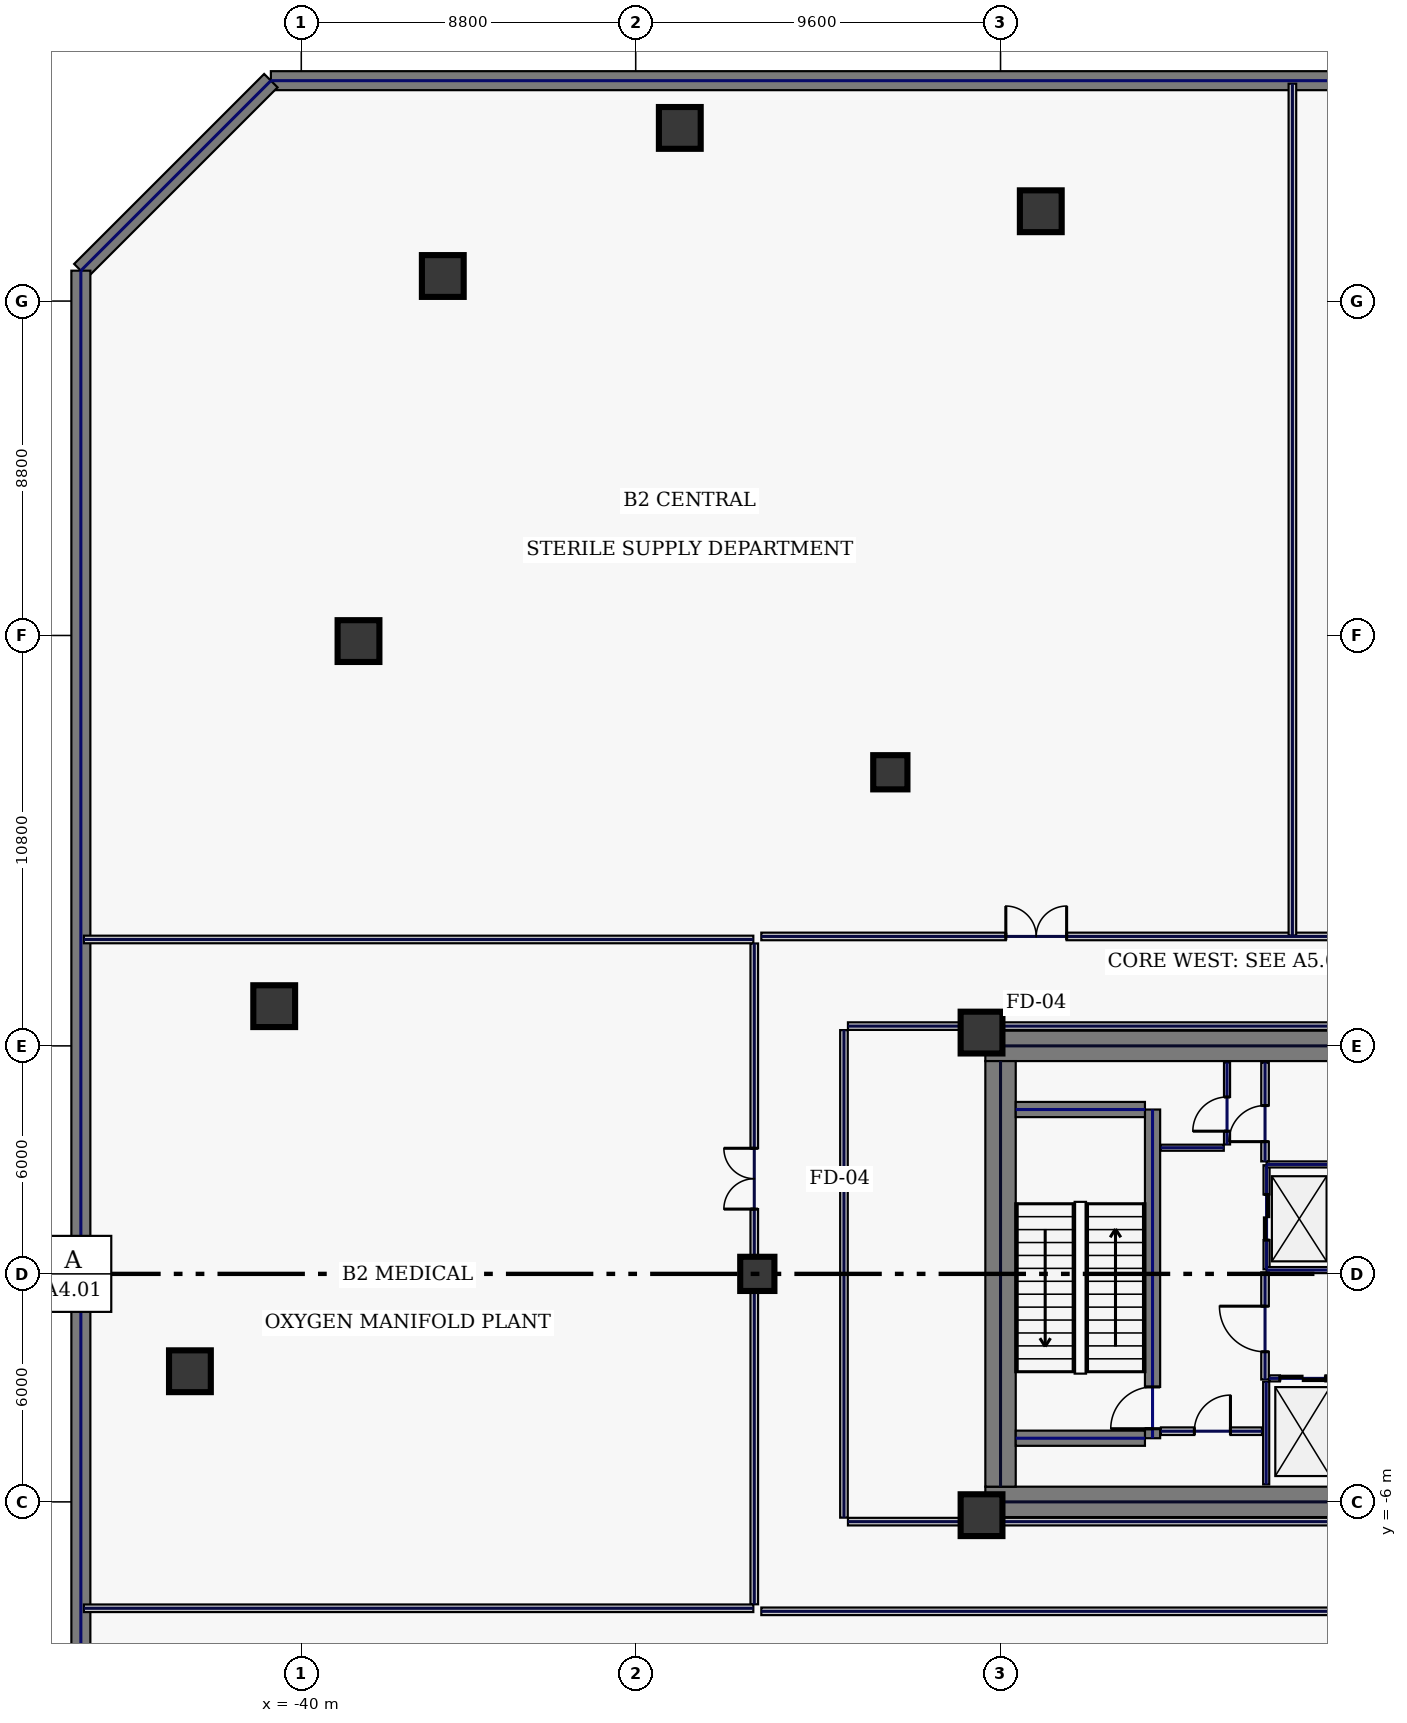
"""IFC4 building model, lengths in metres.
Left out: names, types, materials, properties, quantities, classifications, styles, units other than length and angle.
Written with IfcOpenShell. Run it as: python <this file> out.ifc"""

import sys

from ifc_helpers import new_model, si_unit, direction, frame, frame_2d, origin, origin_2d, place, context, subcontext, project, spatial, rectangle, extrude, element, fill, save


model = new_model("IFC4")
c1 = context("Model", 3, precision=1e-05, world=origin(), true_north=direction((0.0, 1.0)))
c2 = subcontext(c1, "Body", "Model", "MODEL_VIEW")
j1 = project(units=[si_unit("LENGTHUNIT", "METRE"), si_unit("PLANEANGLEUNIT", "RADIAN")], contexts=[c1])
p1 = place(None, origin())
s1 = spatial("IfcSite", under=j1, at=p1, CompositionType="ELEMENT")
p2 = place(p1, origin())
s2 = spatial("IfcBuilding", under=s1, at=p2, CompositionType="ELEMENT")
p3 = place(p2, frame((0.0, 0.0, -10.2)))
s3 = spatial("IfcBuildingStorey", under=s2, at=p3, CompositionType="ELEMENT", Elevation=-10.2)
p4 = place(p3, frame((40.8, 31.4, 0.0), z_axis=(0.0, 0.0, 1.0), x_axis=(-1.0, 0.0, 0.0)))
e1 = element("IfcWall", 1, at=p4, inside=s3, PredefinedType="SHEAR", context=c2, shape_type="SweptSolid", body=[
    extrude(rectangle(XDim=81.6, YDim=0.5, at=frame_2d((40.8, 0.0))), origin(), (0.0, 0.0, 1.0), 4.45),
])
p5 = place(p3, frame((-40.8, 31.4, 0.0), z_axis=(0.0, 0.0, 1.0), x_axis=(-0.707106781187, -0.707106781187, 0.0)))
e2 = element("IfcWall", 2, at=p5, inside=s3, PredefinedType="SHEAR", context=c2, shape_type="SweptSolid", body=[
    extrude(rectangle(XDim=7.071, YDim=0.5, at=frame_2d((3.536, 0.0))), origin(), (0.0, 0.0, 1.0), 4.45),
])
p6 = place(p3, frame((-45.8, 26.4, 0.0), z_axis=(0.0, 0.0, 1.0), x_axis=(0.0, -1.0, 0.0)))
e3 = element("IfcWall", 3, at=p6, inside=s3, PredefinedType="SHEAR", context=c2, shape_type="SweptSolid", body=[
    extrude(rectangle(XDim=56.2, YDim=0.5, at=frame_2d((28.1, 0.0))), origin(), (0.0, 0.0, 1.0), 4.45),
])
for number, where, z_axis, x_axis in (
    (4, (-22.0, 6.0, 0.0), (0.0, 0.0, 1.0), (1.0, 0.0, 0.0)),
    (5, (-22.0, -6.0, 0.0), (0.0, 0.0, 1.0), (1.0, 0.0, 0.0)),
):
    element("IfcWall", number, at=place(p3, frame(where, z_axis=z_axis, x_axis=x_axis)), inside=s3, PredefinedType="SHEAR", context=c2, shape_type="SweptSolid", body=[
        extrude(rectangle(XDim=11.6, YDim=0.8, at=frame_2d((5.8, 0.0))), origin(), (0.0, 0.0, 1.0), 4.45),
    ])
p7 = place(p3, frame((-21.6, -5.6, 0.0), z_axis=(0.0, 0.0, 1.0), x_axis=(0.0, 1.0, 0.0)))
e6 = element("IfcWall", 6, at=p7, inside=s3, PredefinedType="SHEAR", context=c2, shape_type="SweptSolid", body=[
    extrude(rectangle(XDim=11.2, YDim=0.8, at=frame_2d((5.6, 0.0))), origin(), (0.0, 0.0, 1.0), 4.45),
])
p8 = place(p3, frame((-17.6, -4.325, 0.0), z_axis=(0.0, 0.0, 1.0), x_axis=(0.0, 1.0, 0.0)))
e7 = element("IfcWall", 7, at=p8, inside=s3, PredefinedType="SHEAR", context=c2, shape_type="SweptSolid", body=[
    extrude(rectangle(XDim=8.65, YDim=0.4, at=frame_2d((4.325, 0.0))), origin(), (0.0, 0.0, 1.0), 4.45),
])
p9 = place(p8, frame((0.25, 0.0, 0.0)))
e8 = element("IfcOpeningElement", 8, at=p9, cuts=e7, PredefinedType="OPENING", context=c2, shape_type="SweptSolid", body=[
    extrude(rectangle(XDim=1.1, YDim=2.2, at=frame_2d((0.55, 1.1))), frame((0.0, 0.21, 0.0), z_axis=(0.0, -1.0, 0.0), x_axis=(1.0, 0.0, 0.0)), (0.0, 0.0, 1.0), 0.42),
])
for number, where, z_axis, x_axis in (
    (9, (-21.2, -4.325, 0.0), (0.0, 0.0, 1.0), (1.0, 0.0, 0.0)),
    (10, (-21.2, 4.325, 0.0), (0.0, 0.0, 1.0), (1.0, 0.0, 0.0)),
):
    element("IfcWall", number, at=place(p3, frame(where, z_axis=z_axis, x_axis=x_axis)), inside=s3, PredefinedType="SHEAR", context=c2, shape_type="SweptSolid", body=[
        extrude(rectangle(XDim=3.4, YDim=0.4, at=frame_2d((1.7, 0.0))), origin(), (0.0, 0.0, 1.0), 4.45),
    ])
for number, where, z_axis, x_axis in (
    (11, (-22.1, -6.35, 0.0), (0.0, 0.0, 1.0), (1.0, 0.0, 0.0)),
    (12, (-22.1, 6.35, 0.0), (0.0, 0.0, 1.0), (1.0, 0.0, 0.0)),
):
    element("IfcColumn", number, at=place(p3, frame(where, z_axis=z_axis, x_axis=x_axis)), inside=s3, PredefinedType="COLUMN", context=c2, shape_type="SweptSolid", body=[
        extrude(rectangle(XDim=1.1, YDim=1.1, at=origin_2d()), origin(), (0.0, 0.0, 1.0), 4.45),
    ])
for number, where, z_axis, x_axis in (
    (13, (-24.5, 13.2, 0.0), (0.0, 0.0, 1.0), (1.0, 0.0, 0.0)),
    (14, (-28.0, 0.0, 0.0), (0.0, 0.0, 1.0), (1.0, 0.0, 0.0)),
):
    element("IfcColumn", number, at=place(p3, frame(where, z_axis=z_axis, x_axis=x_axis)), inside=s3, PredefinedType="COLUMN", context=c2, shape_type="SweptSolid", body=[
        extrude(rectangle(XDim=0.9, YDim=0.9, at=origin_2d()), origin(), (0.0, 0.0, 1.0), 4.45),
    ])
for number, where, z_axis, x_axis in (
    (15, (-20.541, 27.964, 0.0), (0.0, 0.0, 1.0), (1.0, 0.0, 0.0)),
    (16, (-30.04, 30.156, 0.0), (0.0, 0.0, 1.0), (1.0, 0.0, 0.0)),
    (17, (-36.276, 26.26, 0.0), (0.0, 0.0, 1.0), (1.0, 0.0, 0.0)),
    (18, (-38.494, 16.652, 0.0), (0.0, 0.0, 1.0), (1.0, 0.0, 0.0)),
    (19, (-40.712, 7.045, 0.0), (0.0, 0.0, 1.0), (1.0, 0.0, 0.0)),
    (20, (-42.93, -2.562, 0.0), (0.0, 0.0, 1.0), (1.0, 0.0, 0.0)),
):
    element("IfcColumn", number, at=place(p3, frame(where, z_axis=z_axis, x_axis=x_axis)), inside=s3, PredefinedType="COLUMN", context=c2, shape_type="SweptSolid", body=[
        extrude(rectangle(XDim=1.1, YDim=1.1, at=origin_2d()), origin(), (0.0, 0.0, 1.0), 4.45),
    ])
p10 = place(p3, frame((-14.6, 0.12, 0.0), z_axis=(0.0, 0.0, 1.0), x_axis=(0.0, 1.0, 0.0)))
e21 = element("IfcWall", 21, at=p10, inside=s3, PredefinedType="PARTITIONING", context=c2, shape_type="SweptSolid", body=[
    extrude(rectangle(XDim=2.74, YDim=0.16, at=frame_2d((1.37, 0.0))), origin(), (0.0, 0.0, 1.0), 4.45),
])
p11 = place(p10, frame((0.77, 0.0, 0.0)))
e22 = element("IfcOpeningElement", 22, at=p11, cuts=e21, PredefinedType="OPENING", context=c2, shape_type="SweptSolid", body=[
    extrude(rectangle(XDim=1.2, YDim=2.2, at=frame_2d((0.6, 1.1))), frame((0.0, 0.09, 0.0), z_axis=(0.0, -1.0, 0.0), x_axis=(1.0, 0.0, 0.0)), (0.0, 0.0, 1.0), 0.18),
])
for number, where, z_axis, x_axis in (
    (23, (-14.6, 0.1, 0.0), (0.0, 0.0, 1.0), (1.0, 0.0, 0.0)),
    (24, (-14.6, 2.88, 0.0), (0.0, 0.0, 1.0), (1.0, 0.0, 0.0)),
):
    element("IfcWall", number, at=place(p3, frame(where, z_axis=z_axis, x_axis=x_axis)), inside=s3, PredefinedType="PARTITIONING", context=c2, shape_type="SweptSolid", body=[
        extrude(rectangle(XDim=1.76, YDim=0.16, at=frame_2d((0.88, 0.0))), origin(), (0.0, 0.0, 1.0), 4.45),
    ])
p12 = place(p3, frame((-14.53, -2.75, 0.0), z_axis=(0.0, 0.0, 1.0), x_axis=(1.0, 0.0, 0.0)))
e25 = element("IfcWall", 25, at=p12, inside=s3, PredefinedType="PARTITIONING", context=c2, shape_type="SweptSolid", body=[
    extrude(rectangle(XDim=1.76, YDim=0.16, at=frame_2d((0.88, 0.0))), origin(), (0.0, 0.0, 1.0), 4.45),
])
p13 = place(p12, frame((0.28, 0.0, 0.0)))
e26 = element("IfcOpeningElement", 26, at=p13, cuts=e25, PredefinedType="OPENING", context=c2, shape_type="SweptSolid", body=[
    extrude(rectangle(XDim=1.2, YDim=2.2, at=frame_2d((0.6, 1.1))), frame((0.0, 0.09, 0.0), z_axis=(0.0, -1.0, 0.0), x_axis=(1.0, 0.0, 0.0)), (0.0, 0.0, 1.0), 0.18),
])
p14 = place(p3, frame((-14.61, -5.54, 0.0), z_axis=(0.0, 0.0, 1.0), x_axis=(0.0, 1.0, 0.0)))
e27 = element("IfcWall", 27, at=p14, inside=s3, PredefinedType="PARTITIONING", context=c2, shape_type="SweptSolid", body=[
    extrude(rectangle(XDim=2.7, YDim=0.16, at=frame_2d((1.35, 0.0))), origin(), (0.0, 0.0, 1.0), 4.45),
])
p15 = place(p3, frame((-15.64, 3.405, 0.0), z_axis=(0.0, 0.0, 1.0), x_axis=(0.0, 1.0, 0.0)))
e28 = element("IfcWall", 28, at=p15, inside=s3, PredefinedType="PARTITIONING", context=c2, shape_type="SweptSolid", body=[
    extrude(rectangle(XDim=2.155, YDim=0.16, at=frame_2d((1.078, 0.0))), origin(), (0.0, 0.0, 1.0), 4.45),
])
p16 = place(p15, frame((0.35, 0.0, 0.0)))
e29 = element("IfcOpeningElement", 29, at=p16, cuts=e28, PredefinedType="OPENING", context=c2, shape_type="SweptSolid", body=[
    extrude(rectangle(XDim=0.9, YDim=2.2, at=frame_2d((0.45, 1.1))), frame((0.0, 0.09, 0.0), z_axis=(0.0, -1.0, 0.0), x_axis=(1.0, 0.0, 0.0)), (0.0, 0.0, 1.0), 0.18),
])
p17 = place(p3, frame((-17.38, 3.32, 0.0), z_axis=(0.0, 0.0, 1.0), x_axis=(1.0, 0.0, 0.0)))
e30 = element("IfcWall", 30, at=p17, inside=s3, PredefinedType="PARTITIONING", context=c2, shape_type="SweptSolid", body=[
    extrude(rectangle(XDim=1.655, YDim=0.16, at=frame_2d((0.827, 0.0))), origin(), (0.0, 0.0, 1.0), 4.45),
])
p18 = place(p3, frame((-17.38, -4.14, 0.0), z_axis=(0.0, 0.0, 1.0), x_axis=(1.0, 0.0, 0.0)))
e31 = element("IfcWall", 31, at=p18, inside=s3, PredefinedType="SOLIDWALL", context=c2, shape_type="SweptSolid", body=[
    extrude(rectangle(XDim=2.66, YDim=0.2, at=frame_2d((1.33, 0.0))), origin(), (0.0, 0.0, 1.0), 4.45),
])
p19 = place(p18, frame((0.88, 0.0, 0.0)))
e32 = element("IfcOpeningElement", 32, at=p19, cuts=e31, PredefinedType="OPENING", context=c2, shape_type="SweptSolid", body=[
    extrude(rectangle(XDim=0.95, YDim=2.2, at=frame_2d((0.475, 1.1))), frame((0.0, 0.11, 0.0), z_axis=(0.0, -1.0, 0.0), x_axis=(1.0, 0.0, 0.0)), (0.0, 0.0, 1.0), 0.22),
])
p20 = place(p3, frame((-14.64, 2.96, 0.0), z_axis=(0.0, 0.0, 1.0), x_axis=(0.0, 1.0, 0.0)))
e33 = element("IfcWall", 33, at=p20, inside=s3, PredefinedType="SOLIDWALL", context=c2, shape_type="SweptSolid", body=[
    extrude(rectangle(XDim=2.6, YDim=0.2, at=frame_2d((1.3, 0.0))), origin(), (0.0, 0.0, 1.0), 4.45),
])
p21 = place(p20, frame((0.52, 0.0, 0.0)))
e34 = element("IfcOpeningElement", 34, at=p21, cuts=e33, PredefinedType="OPENING", context=c2, shape_type="SweptSolid", body=[
    extrude(rectangle(XDim=0.95, YDim=2.2, at=frame_2d((0.475, 1.1))), frame((0.0, 0.11, 0.0), z_axis=(0.0, -1.0, 0.0), x_axis=(1.0, 0.0, 0.0)), (0.0, 0.0, 1.0), 0.22),
])
p22 = place(p3, frame((-14.64, -2.78, 0.0), z_axis=(0.0, 0.0, 1.0), x_axis=(0.0, 1.0, 0.0)))
e35 = element("IfcWall", 35, at=p22, inside=s3, PredefinedType="SOLIDWALL", context=c2, shape_type="SweptSolid", body=[
    extrude(rectangle(XDim=2.82, YDim=0.2, at=frame_2d((1.41, 0.0))), origin(), (0.0, 0.0, 1.0), 4.45),
])
p23 = place(p22, frame((0.73, 0.0, 0.0)))
e36 = element("IfcOpeningElement", 36, at=p23, cuts=e35, PredefinedType="OPENING", context=c2, shape_type="SweptSolid", body=[
    extrude(rectangle(XDim=1.2, YDim=2.2, at=frame_2d((0.6, 1.1))), frame((0.0, 0.11, 0.0), z_axis=(0.0, -1.0, 0.0), x_axis=(1.0, 0.0, 0.0)), (0.0, 0.0, 1.0), 0.22),
])
p24 = place(p3, frame((-28.08, -8.695, 0.0), z_axis=(0.0, 0.0, 1.0), x_axis=(0.0, 1.0, 0.0)))
e37 = element("IfcWall", 37, at=p24, inside=s3, PredefinedType="SOLIDWALL", context=c2, shape_type="SweptSolid", body=[
    extrude(rectangle(XDim=17.39, YDim=0.2, at=frame_2d((8.695, 0.0))), origin(), (0.0, 0.0, 1.0), 4.45),
])
p25 = place(p24, frame((10.4, 0.0, 0.0)))
e38 = element("IfcOpeningElement", 38, at=p25, cuts=e37, PredefinedType="OPENING", context=c2, shape_type="SweptSolid", body=[
    extrude(rectangle(XDim=1.6, YDim=2.3, at=frame_2d((0.8, 1.15))), frame((0.0, 0.11, 0.0), z_axis=(0.0, -1.0, 0.0), x_axis=(1.0, 0.0, 0.0)), (0.0, 0.0, 1.0), 0.22),
])
p26 = place(p3, frame((-27.895, 8.88, 0.0), z_axis=(0.0, 0.0, 1.0), x_axis=(1.0, 0.0, 0.0)))
e39 = element("IfcWall", 39, at=p26, inside=s3, PredefinedType="SOLIDWALL", context=c2, shape_type="SweptSolid", body=[
    extrude(rectangle(XDim=55.79, YDim=0.2, at=frame_2d((27.895, 0.0))), origin(), (0.0, 0.0, 1.0), 4.45),
])
p27 = place(p26, frame((6.434, 0.0, 0.0)))
e40 = element("IfcOpeningElement", 40, at=p27, cuts=e39, PredefinedType="OPENING", context=c2, shape_type="SweptSolid", body=[
    extrude(rectangle(XDim=1.6, YDim=2.3, at=frame_2d((0.8, 1.15))), frame((0.0, 0.11, 0.0), z_axis=(0.0, -1.0, 0.0), x_axis=(1.0, 0.0, 0.0)), (0.0, 0.0, 1.0), 0.22),
])
p28 = place(p26, frame((27.28, 0.0, 0.0)))
e41 = element("IfcOpeningElement", 41, at=p28, cuts=e39, PredefinedType="OPENING", context=c2, shape_type="SweptSolid", body=[
    extrude(rectangle(XDim=1.6, YDim=2.3, at=frame_2d((0.8, 1.15))), frame((0.0, 0.11, 0.0), z_axis=(0.0, -1.0, 0.0), x_axis=(1.0, 0.0, 0.0)), (0.0, 0.0, 1.0), 0.22),
])
p29 = place(p26, frame((48.046, 0.0, 0.0)))
e42 = element("IfcOpeningElement", 42, at=p29, cuts=e39, PredefinedType="OPENING", context=c2, shape_type="SweptSolid", body=[
    extrude(rectangle(XDim=1.6, YDim=2.3, at=frame_2d((0.8, 1.15))), frame((0.0, 0.11, 0.0), z_axis=(0.0, -1.0, 0.0), x_axis=(1.0, 0.0, 0.0)), (0.0, 0.0, 1.0), 0.22),
])
p30 = place(p3, frame((27.895, -8.88, 0.0), z_axis=(0.0, 0.0, 1.0), x_axis=(-1.0, 0.0, 0.0)))
e43 = element("IfcWall", 43, at=p30, inside=s3, PredefinedType="SOLIDWALL", context=c2, shape_type="SweptSolid", body=[
    extrude(rectangle(XDim=55.79, YDim=0.2, at=frame_2d((27.895, 0.0))), origin(), (0.0, 0.0, 1.0), 4.45),
])
p31 = place(p30, frame((27.2, 0.0, 0.0)))
e44 = element("IfcOpeningElement", 44, at=p31, cuts=e43, PredefinedType="OPENING", context=c2, shape_type="SweptSolid", body=[
    extrude(rectangle(XDim=1.6, YDim=2.3, at=frame_2d((0.8, 1.15))), frame((0.0, 0.11, 0.0), z_axis=(0.0, -1.0, 0.0), x_axis=(1.0, 0.0, 0.0)), (0.0, 0.0, 1.0), 0.22),
])
p32 = place(p3, frame((-10.38, 6.52, 0.0), z_axis=(0.0, 0.0, 1.0), x_axis=(-1.0, 0.0, 0.0)))
e45 = element("IfcWall", 45, at=p32, inside=s3, PredefinedType="SOLIDWALL", context=c2, shape_type="SweptSolid", body=[
    extrude(rectangle(XDim=15.235, YDim=0.2, at=frame_2d((7.618, 0.0))), origin(), (0.0, 0.0, 1.0), 4.45),
])
p33 = place(p3, frame((-25.72, 6.415, 0.0), z_axis=(0.0, 0.0, 1.0), x_axis=(0.0, -1.0, 0.0)))
e46 = element("IfcWall", 46, at=p33, inside=s3, PredefinedType="SOLIDWALL", context=c2, shape_type="SweptSolid", body=[
    extrude(rectangle(XDim=12.83, YDim=0.2, at=frame_2d((6.415, 0.0))), origin(), (0.0, 0.0, 1.0), 4.45),
])
p34 = place(p3, frame((-25.615, -6.52, 0.0), z_axis=(0.0, 0.0, 1.0), x_axis=(1.0, 0.0, 0.0)))
e47 = element("IfcWall", 47, at=p34, inside=s3, PredefinedType="SOLIDWALL", context=c2, shape_type="SweptSolid", body=[
    extrude(rectangle(XDim=15.235, YDim=0.2, at=frame_2d((7.618, 0.0))), origin(), (0.0, 0.0, 1.0), 4.45),
])
for number, where, z_axis, x_axis in (
    (48, (-45.72, -8.8, 0.0), (0.0, 0.0, 1.0), (1.0, 0.0, 0.0)),
    (49, (-45.72, 8.8, 0.0), (0.0, 0.0, 1.0), (1.0, 0.0, 0.0)),
):
    element("IfcWall", number, at=place(p3, frame(where, z_axis=z_axis, x_axis=x_axis)), inside=s3, PredefinedType="SOLIDWALL", context=c2, shape_type="SweptSolid", body=[
        extrude(rectangle(XDim=17.615, YDim=0.2, at=frame_2d((8.808, 0.0))), origin(), (0.0, 0.0, 1.0), 4.45),
    ])
p35 = place(p3, frame((-13.92, 8.905, 0.0), z_axis=(0.0, 0.0, 1.0), x_axis=(0.0, 1.0, 0.0)))
e50 = element("IfcWall", 50, at=p35, inside=s3, PredefinedType="SOLIDWALL", context=c2, shape_type="SweptSolid", body=[
    extrude(rectangle(XDim=22.415, YDim=0.2, at=frame_2d((11.208, 0.0))), origin(), (0.0, 0.0, 1.0), 4.45),
])
p36 = place(p9, origin())
e51 = element("IfcDoor", 51, at=p36, inside=s3, OperationType="SINGLE_SWING_LEFT", PredefinedType="DOOR", context=c2, shape_type="SweptSolid", body=[
    extrude(rectangle(XDim=1.1, YDim=2.2, at=frame_2d((0.55, 1.1))), frame((0.0, 0.025, 0.0), z_axis=(0.0, -1.0, 0.0), x_axis=(1.0, 0.0, 0.0)), (0.0, 0.0, 1.0), 0.05),
])
fill(e8, e51)
p37 = place(p11, origin())
e52 = element("IfcDoor", 52, at=p37, inside=s3, OperationType="SLIDING_TO_LEFT", PredefinedType="DOOR", context=c2, shape_type="SweptSolid", body=[
    extrude(rectangle(XDim=1.2, YDim=2.2, at=frame_2d((0.6, 1.1))), frame((0.0, 0.025, 0.0), z_axis=(0.0, -1.0, 0.0), x_axis=(1.0, 0.0, 0.0)), (0.0, 0.0, 1.0), 0.05),
])
fill(e22, e52)
p38 = place(p13, origin())
e53 = element("IfcDoor", 53, at=p38, inside=s3, OperationType="SLIDING_TO_LEFT", PredefinedType="DOOR", context=c2, shape_type="SweptSolid", body=[
    extrude(rectangle(XDim=1.2, YDim=2.2, at=frame_2d((0.6, 1.1))), frame((0.0, 0.025, 0.0), z_axis=(0.0, -1.0, 0.0), x_axis=(1.0, 0.0, 0.0)), (0.0, 0.0, 1.0), 0.05),
])
fill(e26, e53)
p39 = place(p16, origin())
e54 = element("IfcDoor", 54, at=p39, inside=s3, OperationType="SINGLE_SWING_LEFT", PredefinedType="DOOR", context=c2, shape_type="SweptSolid", body=[
    extrude(rectangle(XDim=0.9, YDim=2.2, at=frame_2d((0.45, 1.1))), frame((0.0, 0.025, 0.0), z_axis=(0.0, -1.0, 0.0), x_axis=(1.0, 0.0, 0.0)), (0.0, 0.0, 1.0), 0.05),
])
fill(e29, e54)
p40 = place(p19, origin())
e55 = element("IfcDoor", 55, at=p40, inside=s3, OperationType="SINGLE_SWING_RIGHT", PredefinedType="DOOR", context=c2, shape_type="SweptSolid", body=[
    extrude(rectangle(XDim=0.95, YDim=2.2, at=frame_2d((0.475, 1.1))), frame((0.0, 0.025, 0.0), z_axis=(0.0, -1.0, 0.0), x_axis=(1.0, 0.0, 0.0)), (0.0, 0.0, 1.0), 0.05),
])
fill(e32, e55)
p41 = place(p21, origin())
e56 = element("IfcDoor", 56, at=p41, inside=s3, OperationType="SINGLE_SWING_LEFT", PredefinedType="DOOR", context=c2, shape_type="SweptSolid", body=[
    extrude(rectangle(XDim=0.95, YDim=2.2, at=frame_2d((0.475, 1.1))), frame((0.0, 0.025, 0.0), z_axis=(0.0, -1.0, 0.0), x_axis=(1.0, 0.0, 0.0)), (0.0, 0.0, 1.0), 0.05),
])
fill(e34, e56)
p42 = place(p23, origin())
e57 = element("IfcDoor", 57, at=p42, inside=s3, OperationType="SINGLE_SWING_RIGHT", PredefinedType="DOOR", context=c2, shape_type="SweptSolid", body=[
    extrude(rectangle(XDim=1.2, YDim=2.2, at=frame_2d((0.6, 1.1))), frame((0.0, 0.025, 0.0), z_axis=(0.0, -1.0, 0.0), x_axis=(1.0, 0.0, 0.0)), (0.0, 0.0, 1.0), 0.05),
])
fill(e36, e57)
p43 = place(p27, origin())
e58 = element("IfcDoor", 58, at=p43, inside=s3, OperationType="DOUBLE_SWING_LEFT", PredefinedType="DOOR", context=c2, shape_type="SweptSolid", body=[
    extrude(rectangle(XDim=1.6, YDim=2.3, at=frame_2d((0.8, 1.15))), frame((0.0, 0.025, 0.0), z_axis=(0.0, -1.0, 0.0), x_axis=(1.0, 0.0, 0.0)), (0.0, 0.0, 1.0), 0.05),
])
fill(e40, e58)
p44 = place(p25, origin())
e59 = element("IfcDoor", 59, at=p44, inside=s3, OperationType="DOUBLE_SWING_LEFT", PredefinedType="DOOR", context=c2, shape_type="SweptSolid", body=[
    extrude(rectangle(XDim=1.6, YDim=2.3, at=frame_2d((0.8, 1.15))), frame((0.0, 0.025, 0.0), z_axis=(0.0, -1.0, 0.0), x_axis=(1.0, 0.0, 0.0)), (0.0, 0.0, 1.0), 0.05),
])
fill(e38, e59)
save(model, sys.argv[1])
